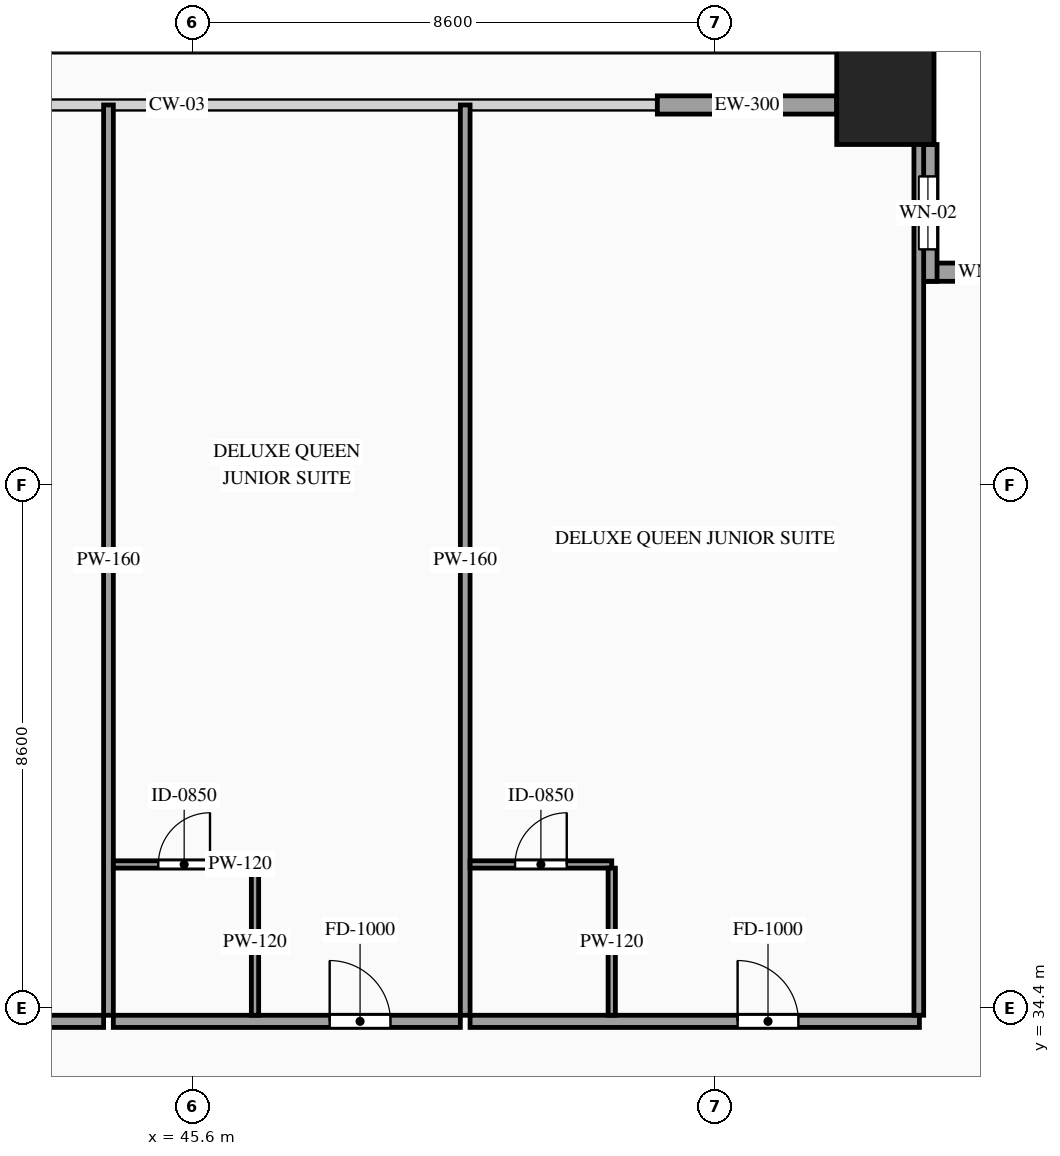
"""IFC4 building model, lengths in metres.
Left out: names, types, materials, properties, quantities, classifications, styles, units other than length and angle.
Written with IfcOpenShell. Run it as: python <this file> out.ifc"""

import sys

from ifc_helpers import new_model, si_unit, direction, frame, frame_2d, origin, origin_2d, place, context, subcontext, project, spatial, rectangle, hollow_rectangle, extrude, source, transform, mapped, element, fill, save


model = new_model("IFC4")
c1 = context("Model", 3, precision=1e-05, world=origin(), true_north=direction((0.0, 1.0)))
c2 = subcontext(c1, "Body", "Model", "MODEL_VIEW")
j1 = project(units=[si_unit("LENGTHUNIT", "METRE"), si_unit("PLANEANGLEUNIT", "RADIAN")], contexts=[c1])
p1 = place(None, origin())
s1 = spatial("IfcSite", under=j1, at=p1, CompositionType="ELEMENT")
p2 = place(p1, origin())
s2 = spatial("IfcBuilding", under=s1, at=p2, CompositionType="ELEMENT")
p3 = place(p2, frame((0.0, 0.0, 159.6)))
s3 = spatial("IfcBuildingStorey", under=s2, at=p3, CompositionType="ELEMENT", Elevation=159.6)
m1 = source(origin(), c2, "Body", "SweptSolid", [
    extrude(hollow_rectangle(XDim=1.6, YDim=1.6, WallThickness=0.07, at=origin_2d()), origin(), (0.0, 0.0, 1.0), 3.6),
])
p4 = place(p3, frame((57.0, 49.4, 0.0), z_axis=(0.0, 0.0, 1.0), x_axis=(1.0, 0.0, 0.0)))
e1 = element("IfcColumn", 1, at=p4, inside=s3, PredefinedType="COLUMN", context=c2, shape_type="MappedRepresentation", body=[
    mapped(m1, transform((0.0, 0.0, 0.0), scale=1.0)),
])
p5 = place(p3, frame((59.8, 46.5, 0.0), z_axis=(0.0, 0.0, 1.0), x_axis=(-1.0, 0.0, 0.0)))
e2 = element("IfcWall", 2, at=p5, inside=s3, PredefinedType="SOLIDWALL", context=c2, shape_type="SweptSolid", body=[
    extrude(rectangle(XDim=2.25, YDim=0.3, at=frame_2d((1.125, 0.0))), origin(), (0.0, 0.0, 1.0), 3.38),
])
p6 = place(p5, frame((0.675, 0.0, 0.85)))
e3 = element("IfcOpeningElement", 3, at=p6, cuts=e2, PredefinedType="OPENING", context=c2, shape_type="SweptSolid", body=[
    extrude(rectangle(XDim=0.9, YDim=1.5, at=frame_2d((0.45, 0.75))), frame((0.0, 0.165, 0.0), z_axis=(0.0, -1.0, 0.0), x_axis=(1.0, 0.0, 0.0)), (0.0, 0.0, 1.0), 0.33),
])
p7 = place(p3, frame((57.7, 46.35, 0.0), z_axis=(0.0, 0.0, 1.0), x_axis=(0.0, 1.0, 0.0)))
e4 = element("IfcWall", 4, at=p7, inside=s3, PredefinedType="SOLIDWALL", context=c2, shape_type="SweptSolid", body=[
    extrude(rectangle(XDim=2.25, YDim=0.3, at=frame_2d((1.125, 0.0))), origin(), (0.0, 0.0, 1.0), 3.38),
])
p8 = place(p7, frame((0.525, 0.0, 0.85)))
e5 = element("IfcOpeningElement", 5, at=p8, cuts=e4, PredefinedType="OPENING", context=c2, shape_type="SweptSolid", body=[
    extrude(rectangle(XDim=1.2, YDim=2.1, at=frame_2d((0.6, 1.05))), frame((0.0, 0.165, 0.0), z_axis=(0.0, -1.0, 0.0), x_axis=(1.0, 0.0, 0.0)), (0.0, 0.0, 1.0), 0.33),
])
m2 = source(origin(), c2, "Body", "SweptSolid", [
    extrude(rectangle(XDim=2.95, YDim=0.3, at=frame_2d((1.475, 0.0))), origin(), (0.0, 0.0, 1.0), 2.775),
])
p9 = place(p3, frame((53.25, 49.25, 0.0), z_axis=(0.0, 0.0, 1.0), x_axis=(1.0, 0.0, 0.0)))
e6 = element("IfcWall", 6, at=p9, inside=s3, PredefinedType="SOLIDWALL", context=c2, shape_type="MappedRepresentation", body=[
    mapped(m2, transform((0.0, 0.0, 0.0), scale=1.0)),
])
p10 = place(p3, frame((37.08, 34.18, 0.0), z_axis=(0.0, 0.0, 1.0), x_axis=(1.0, 0.0, 0.0)))
e7 = element("IfcWall", 7, at=p10, inside=s3, PredefinedType="PARTITIONING", context=c2, shape_type="SweptSolid", body=[
    extrude(rectangle(XDim=7.063, YDim=0.2, at=frame_2d((3.531, 0.0))), origin(), (0.0, 0.0, 1.0), 3.38),
])
p11 = place(p10, frame((4.236, 0.0, 0.0)))
e8 = element("IfcOpeningElement", 8, at=p11, cuts=e7, PredefinedType="OPENING", context=c2, shape_type="SweptSolid", body=[
    extrude(rectangle(XDim=1.0, YDim=2.2, at=frame_2d((0.5, 1.1))), frame((0.0, 0.115, 0.0), z_axis=(0.0, -1.0, 0.0), x_axis=(1.0, 0.0, 0.0)), (0.0, 0.0, 1.0), 0.23),
])
m3 = source(origin(), c2, "Body", "SweptSolid", [
    extrude(rectangle(XDim=14.97, YDim=0.16, at=frame_2d((7.485, 0.0))), origin(), (0.0, 0.0, 1.0), 3.38),
])
p12 = place(p3, frame((44.223, 34.28, 0.0), z_axis=(0.0, 0.0, 1.0), x_axis=(0.0, 1.0, 0.0)))
e9 = element("IfcWall", 9, at=p12, inside=s3, PredefinedType="PARTITIONING", context=c2, shape_type="MappedRepresentation", body=[
    mapped(m3, transform((0.0, 0.0, 0.0), scale=1.0)),
])
p13 = place(p3, frame((44.303, 34.18, 0.0), z_axis=(0.0, 0.0, 1.0), x_axis=(1.0, 0.0, 0.0)))
e10 = element("IfcWall", 10, at=p13, inside=s3, PredefinedType="PARTITIONING", context=c2, shape_type="SweptSolid", body=[
    extrude(rectangle(XDim=5.707, YDim=0.2, at=frame_2d((2.854, 0.0))), origin(), (0.0, 0.0, 1.0), 3.38),
])
p14 = place(p13, frame((3.558, 0.0, 0.0)))
e11 = element("IfcOpeningElement", 11, at=p14, cuts=e10, PredefinedType="OPENING", context=c2, shape_type="SweptSolid", body=[
    extrude(rectangle(XDim=1.0, YDim=2.2, at=frame_2d((0.5, 1.1))), frame((0.0, 0.115, 0.0), z_axis=(0.0, -1.0, 0.0), x_axis=(1.0, 0.0, 0.0)), (0.0, 0.0, 1.0), 0.23),
])
m4 = source(origin(), c2, "Body", "SweptSolid", [
    extrude(rectangle(XDim=14.97, YDim=0.16, at=frame_2d((7.485, 0.0))), origin(), (0.0, 0.0, 1.0), 2.875),
])
p15 = place(p3, frame((50.09, 34.28, 0.0), z_axis=(0.0, 0.0, 1.0), x_axis=(0.0, 1.0, 0.0)))
e12 = element("IfcWall", 12, at=p15, inside=s3, PredefinedType="PARTITIONING", context=c2, shape_type="MappedRepresentation", body=[
    mapped(m4, transform((0.0, 0.0, 0.0), scale=1.0)),
])
p16 = place(p3, frame((44.303, 36.76, 0.0), z_axis=(0.0, 0.0, 1.0), x_axis=(1.0, 0.0, 0.0)))
e13 = element("IfcWall", 13, at=p16, inside=s3, PredefinedType="PARTITIONING", context=c2, shape_type="SweptSolid", body=[
    extrude(rectangle(XDim=2.33, YDim=0.12, at=frame_2d((1.165, 0.0))), origin(), (0.0, 0.0, 1.0), 3.38),
])
p17 = place(p16, frame((0.74, 0.0, 0.0)))
e14 = element("IfcOpeningElement", 14, at=p17, cuts=e13, PredefinedType="OPENING", context=c2, shape_type="SweptSolid", body=[
    extrude(rectangle(XDim=0.85, YDim=2.1, at=frame_2d((0.425, 1.05))), frame((0.0, 0.075, 0.0), z_axis=(0.0, -1.0, 0.0), x_axis=(1.0, 0.0, 0.0)), (0.0, 0.0, 1.0), 0.15),
])
m5 = source(origin(), c2, "Body", "SweptSolid", [
    extrude(rectangle(XDim=2.42, YDim=0.12, at=frame_2d((1.21, 0.0))), origin(), (0.0, 0.0, 1.0), 3.38),
])
p18 = place(p3, frame((46.633, 34.28, 0.0), z_axis=(0.0, 0.0, 1.0), x_axis=(0.0, 1.0, 0.0)))
e15 = element("IfcWall", 15, at=p18, inside=s3, PredefinedType="PARTITIONING", context=c2, shape_type="MappedRepresentation", body=[
    mapped(m5, transform((0.0, 0.0, 0.0), scale=1.0)),
])
p19 = place(p3, frame((50.17, 34.18, 0.0), z_axis=(0.0, 0.0, 1.0), x_axis=(1.0, 0.0, 0.0)))
e16 = element("IfcWall", 16, at=p19, inside=s3, PredefinedType="PARTITIONING", context=c2, shape_type="SweptSolid", body=[
    extrude(rectangle(XDim=7.39, YDim=0.2, at=frame_2d((3.695, 0.0))), origin(), (0.0, 0.0, 1.0), 3.38),
])
p20 = place(p19, frame((4.4, 0.0, 0.0)))
e17 = element("IfcOpeningElement", 17, at=p20, cuts=e16, PredefinedType="OPENING", context=c2, shape_type="SweptSolid", body=[
    extrude(rectangle(XDim=1.0, YDim=2.2, at=frame_2d((0.5, 1.1))), frame((0.0, 0.115, 0.0), z_axis=(0.0, -1.0, 0.0), x_axis=(1.0, 0.0, 0.0)), (0.0, 0.0, 1.0), 0.23),
])
m6 = source(origin(), c2, "Body", "SweptSolid", [
    extrude(rectangle(XDim=14.82, YDim=0.16, at=frame_2d((7.41, 0.0))), origin(), (0.0, 0.0, 1.0), 3.38),
])
p21 = place(p3, frame((57.55, 34.28, 0.0), z_axis=(0.0, 0.0, 1.0), x_axis=(0.0, 1.0, 0.0)))
e18 = element("IfcWall", 18, at=p21, inside=s3, PredefinedType="PARTITIONING", context=c2, shape_type="MappedRepresentation", body=[
    mapped(m6, transform((0.0, 0.0, 0.0), scale=1.0)),
])
p22 = place(p3, frame((50.17, 36.76, 0.0), z_axis=(0.0, 0.0, 1.0), x_axis=(1.0, 0.0, 0.0)))
e19 = element("IfcWall", 19, at=p22, inside=s3, PredefinedType="PARTITIONING", context=c2, shape_type="SweptSolid", body=[
    extrude(rectangle(XDim=2.33, YDim=0.12, at=frame_2d((1.165, 0.0))), origin(), (0.0, 0.0, 1.0), 3.38),
])
p23 = place(p22, frame((0.74, 0.0, 0.0)))
e20 = element("IfcOpeningElement", 20, at=p23, cuts=e19, PredefinedType="OPENING", context=c2, shape_type="SweptSolid", body=[
    extrude(rectangle(XDim=0.85, YDim=2.1, at=frame_2d((0.425, 1.05))), frame((0.0, 0.075, 0.0), z_axis=(0.0, -1.0, 0.0), x_axis=(1.0, 0.0, 0.0)), (0.0, 0.0, 1.0), 0.15),
])
p24 = place(p3, frame((52.5, 34.28, 0.0), z_axis=(0.0, 0.0, 1.0), x_axis=(0.0, 1.0, 0.0)))
e21 = element("IfcWall", 21, at=p24, inside=s3, PredefinedType="PARTITIONING", context=c2, shape_type="MappedRepresentation", body=[
    mapped(m5, transform((0.0, 0.0, 0.0), scale=1.0)),
])
m7 = source(origin(), c2, "Body", "SweptSolid", [
    extrude(rectangle(XDim=0.9, YDim=1.5, at=frame_2d((0.45, 0.75))), frame((0.0, 0.03, 0.0), z_axis=(0.0, -1.0, 0.0), x_axis=(1.0, 0.0, 0.0)), (0.0, 0.0, 1.0), 0.06),
])
p25 = place(p6, origin())
e22 = element("IfcWindow", 22, at=p25, inside=s3, PartitioningType="SINGLE_PANEL", PredefinedType="WINDOW", context=c2, shape_type="MappedRepresentation", body=[
    mapped(m7, transform((0.0, 0.0, 0.0), scale=1.0)),
])
fill(e3, e22)
m8 = source(origin(), c2, "Body", "SweptSolid", [
    extrude(rectangle(XDim=1.2, YDim=2.1, at=frame_2d((0.6, 1.05))), frame((0.0, 0.03, 0.0), z_axis=(0.0, -1.0, 0.0), x_axis=(1.0, 0.0, 0.0)), (0.0, 0.0, 1.0), 0.06),
])
p26 = place(p8, origin())
e23 = element("IfcWindow", 23, at=p26, inside=s3, PartitioningType="SINGLE_PANEL", PredefinedType="WINDOW", context=c2, shape_type="MappedRepresentation", body=[
    mapped(m8, transform((0.0, 0.0, 0.0), scale=1.0)),
])
fill(e5, e23)
m9 = source(origin(), c2, "Body", "SweptSolid", [
    extrude(rectangle(XDim=1.0, YDim=2.2, at=frame_2d((0.5, 1.1))), frame((0.0, 0.025, 0.0), z_axis=(0.0, -1.0, 0.0), x_axis=(1.0, 0.0, 0.0)), (0.0, 0.0, 1.0), 0.05),
])
p27 = place(p14, origin())
e24 = element("IfcDoor", 24, at=p27, inside=s3, OperationType="SINGLE_SWING_LEFT", PredefinedType="DOOR", context=c2, shape_type="MappedRepresentation", body=[
    mapped(m9, transform((0.0, 0.0, 0.0), scale=1.0)),
])
fill(e11, e24)
m10 = source(origin(), c2, "Body", "SweptSolid", [
    extrude(rectangle(XDim=0.85, YDim=2.1, at=frame_2d((0.425, 1.05))), frame((0.0, 0.025, 0.0), z_axis=(0.0, -1.0, 0.0), x_axis=(1.0, 0.0, 0.0)), (0.0, 0.0, 1.0), 0.05),
])
p28 = place(p17, origin())
e25 = element("IfcDoor", 25, at=p28, inside=s3, OperationType="SINGLE_SWING_RIGHT", PredefinedType="DOOR", context=c2, shape_type="MappedRepresentation", body=[
    mapped(m10, transform((0.0, 0.0, 0.0), scale=1.0)),
])
fill(e14, e25)
p29 = place(p20, origin())
e26 = element("IfcDoor", 26, at=p29, inside=s3, OperationType="SINGLE_SWING_LEFT", PredefinedType="DOOR", context=c2, shape_type="MappedRepresentation", body=[
    mapped(m9, transform((0.0, 0.0, 0.0), scale=1.0)),
])
fill(e17, e26)
p30 = place(p23, origin())
e27 = element("IfcDoor", 27, at=p30, inside=s3, OperationType="SINGLE_SWING_RIGHT", PredefinedType="DOOR", context=c2, shape_type="MappedRepresentation", body=[
    mapped(m10, transform((0.0, 0.0, 0.0), scale=1.0)),
])
fill(e20, e27)
save(model, sys.argv[1])
